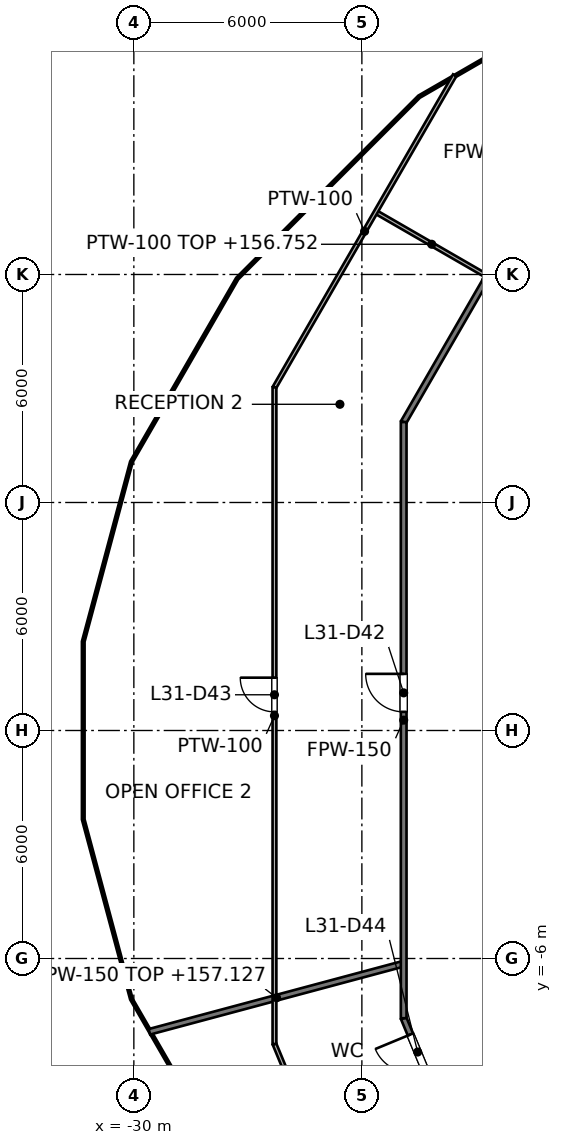
"""IFC4 building model, lengths in metres.
Left out: names, types, materials, properties, quantities, classifications, styles, units other than length and angle.
Written with IfcOpenShell. Run it as: python <this file> out.ifc"""

import sys

from ifc_helpers import new_model, si_unit, direction, frame, frame_2d, origin, place, context, subcontext, project, spatial, rectangle, extrude, element, fill, save


model = new_model("IFC4")
c1 = context("Model", 3, precision=1e-05, world=origin(), true_north=direction((0.0, 1.0)))
c2 = subcontext(c1, "Body", "Model", "MODEL_VIEW")
j1 = project(units=[si_unit("LENGTHUNIT", "METRE"), si_unit("PLANEANGLEUNIT", "RADIAN")], contexts=[c1])
p1 = place(None, origin())
s1 = spatial("IfcSite", under=j1, at=p1, CompositionType="ELEMENT")
p2 = place(p1, origin())
s2 = spatial("IfcBuilding", under=s1, at=p2, CompositionType="ELEMENT")
p3 = place(p2, frame((0.0, 0.0, 153.6)))
s3 = spatial("IfcBuildingStorey", under=s2, at=p3, CompositionType="ELEMENT", Elevation=153.6)
p4 = place(p3, frame((-22.9, -7.572, 0.0), z_axis=(0.0, 0.0, 1.0), x_axis=(0.382860357704, -0.923806227788, 0.0)))
e1 = element("IfcWall", 1, at=p4, inside=s3, PredefinedType="PARTITIONING", context=c2, shape_type="SweptSolid", body=[
    extrude(rectangle(XDim=6.374, YDim=0.15, at=frame_2d((3.187, 0.0))), origin(), (0.0, 0.0, 1.0), 2.995),
])
p5 = place(p4, frame((0.462, 0.0, 0.0)))
e2 = element("IfcOpeningElement", 2, at=p5, cuts=e1, PredefinedType="OPENING", context=c2, shape_type="SweptSolid", body=[
    extrude(rectangle(XDim=1.0, YDim=2.1, at=frame_2d((0.5, 1.05))), frame((0.0, 0.075, 0.0), z_axis=(0.0, -1.0, 0.0), x_axis=(1.0, 0.0, 0.0)), (0.0, 0.0, 1.0), 0.15),
])
p6 = place(p3, frame((-29.591, -7.929, 0.0), z_axis=(0.0, 0.0, 1.0), x_axis=(0.965923037728, 0.258829451931, 0.0)))
e3 = element("IfcWall", 3, at=p6, inside=s3, PredefinedType="PARTITIONING", context=c2, shape_type="SweptSolid", body=[
    extrude(rectangle(XDim=6.927, YDim=0.15, at=frame_2d((3.464, 0.0))), origin(), (0.0, 0.0, 1.0), 3.527),
])
p7 = place(p3, frame((-22.9, 8.117, 0.0), z_axis=(0.0, 0.0, 1.0), x_axis=(0.5000050195, 0.866022505755, 0.0)))
e4 = element("IfcWall", 4, at=p7, inside=s3, PredefinedType="PARTITIONING", context=c2, shape_type="SweptSolid", body=[
    extrude(rectangle(XDim=8.626, YDim=0.15, at=frame_2d((4.313, 0.0))), origin(), (0.0, 0.0, 1.0), 2.927),
])
p8 = place(p3, frame((-22.9, -7.572, 0.0), z_axis=(0.0, 0.0, 1.0), x_axis=(0.0, 1.0, 0.0)))
e5 = element("IfcWall", 5, at=p8, inside=s3, PredefinedType="PARTITIONING", context=c2, shape_type="SweptSolid", body=[
    extrude(rectangle(XDim=15.689, YDim=0.15, at=frame_2d((7.844, 0.0))), origin(), (0.0, 0.0, 1.0), 2.927),
])
p9 = place(p8, frame((8.062, 0.0, 0.0)))
e6 = element("IfcOpeningElement", 6, at=p9, cuts=e5, PredefinedType="OPENING", context=c2, shape_type="SweptSolid", body=[
    extrude(rectangle(XDim=1.0, YDim=2.1, at=frame_2d((0.5, 1.05))), frame((0.0, 0.075, 0.0), z_axis=(0.0, -1.0, 0.0), x_axis=(1.0, 0.0, 0.0)), (0.0, 0.0, 1.0), 0.15),
])
p10 = place(p3, frame((-26.3, -8.249, 0.0), z_axis=(0.0, 0.0, 1.0), x_axis=(0.382878044957, -0.92379889732, 0.0)))
e7 = element("IfcWall", 7, at=p10, inside=s3, PredefinedType="PARTITIONING", context=c2, shape_type="SweptSolid", body=[
    extrude(rectangle(XDim=2.745, YDim=0.1, at=frame_2d((1.373, 0.0))), origin(), (0.0, 0.0, 1.0), 3.076),
])
p11 = place(p3, frame((-23.634, 13.645, 0.0), z_axis=(0.0, 0.0, 1.0), x_axis=(0.866002606077, -0.500039484709, 0.0)))
e8 = element("IfcWall", 8, at=p11, inside=s3, PredefinedType="PARTITIONING", context=c2, shape_type="SweptSolid", body=[
    extrude(rectangle(XDim=3.4, YDim=0.1, at=frame_2d((1.7, 0.0))), origin(), (0.0, 0.0, 1.0), 3.152),
])
p12 = place(p3, frame((-26.3, 9.028, 0.0), z_axis=(0.0, 0.0, 1.0), x_axis=(0.499994996542, 0.866028292513, 0.0)))
e9 = element("IfcWall", 9, at=p12, inside=s3, PredefinedType="PARTITIONING", context=c2, shape_type="SweptSolid", body=[
    extrude(rectangle(XDim=9.486, YDim=0.1, at=frame_2d((4.743, 0.0))), origin(), (0.0, 0.0, 1.0), 2.927),
])
p13 = place(p3, frame((-26.3, -8.249, 0.0), z_axis=(0.0, 0.0, 1.0), x_axis=(0.0, 1.0, 0.0)))
e10 = element("IfcWall", 10, at=p13, inside=s3, PredefinedType="PARTITIONING", context=c2, shape_type="SweptSolid", body=[
    extrude(rectangle(XDim=17.277, YDim=0.1, at=frame_2d((8.639, 0.0))), origin(), (0.0, 0.0, 1.0), 2.927),
])
p14 = place(p13, frame((8.739, 0.0, 0.0)))
e11 = element("IfcOpeningElement", 11, at=p14, cuts=e10, PredefinedType="OPENING", context=c2, shape_type="SweptSolid", body=[
    extrude(rectangle(XDim=0.9, YDim=2.1, at=frame_2d((0.45, 1.05))), frame((0.0, 0.05, 0.0), z_axis=(0.0, -1.0, 0.0), x_axis=(1.0, 0.0, 0.0)), (0.0, 0.0, 1.0), 0.1),
])
p15 = place(p9, origin())
e12 = element("IfcDoor", 12, at=p15, inside=s3, OperationType="SINGLE_SWING_RIGHT", PredefinedType="DOOR", context=c2, shape_type="SweptSolid", body=[
    extrude(rectangle(XDim=1.0, YDim=2.1, at=frame_2d((0.5, 1.05))), frame((0.0, 0.025, 0.0), z_axis=(0.0, -1.0, 0.0), x_axis=(1.0, 0.0, 0.0)), (0.0, 0.0, 1.0), 0.05),
])
fill(e6, e12)
p16 = place(p14, origin())
e13 = element("IfcDoor", 13, at=p16, inside=s3, OperationType="SINGLE_SWING_RIGHT", PredefinedType="DOOR", context=c2, shape_type="SweptSolid", body=[
    extrude(rectangle(XDim=0.9, YDim=2.1, at=frame_2d((0.45, 1.05))), frame((0.0, 0.025, 0.0), z_axis=(0.0, -1.0, 0.0), x_axis=(1.0, 0.0, 0.0)), (0.0, 0.0, 1.0), 0.05),
])
fill(e11, e13)
p17 = place(p5, origin())
e14 = element("IfcDoor", 14, at=p17, inside=s3, OperationType="SINGLE_SWING_LEFT", PredefinedType="DOOR", context=c2, shape_type="SweptSolid", body=[
    extrude(rectangle(XDim=1.0, YDim=2.1, at=frame_2d((0.5, 1.05))), frame((0.0, 0.025, 0.0), z_axis=(0.0, -1.0, 0.0), x_axis=(1.0, 0.0, 0.0)), (0.0, 0.0, 1.0), 0.05),
])
fill(e2, e14)
save(model, sys.argv[1])
